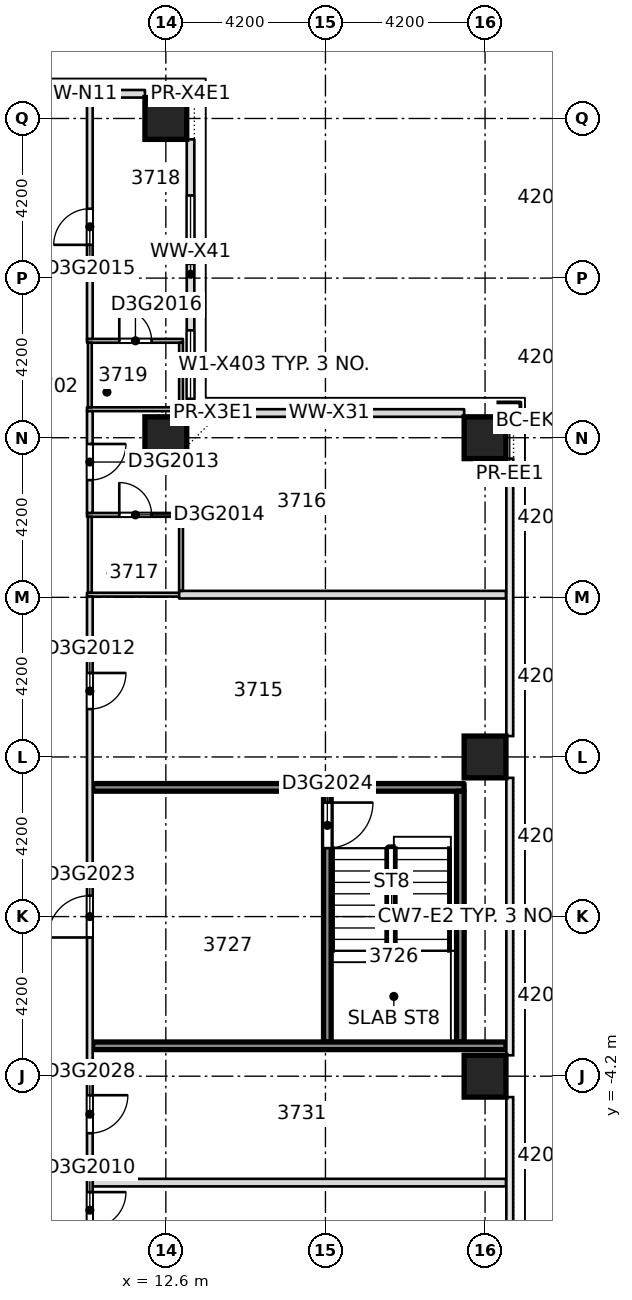
"""IFC4 building model, lengths in metres.
Left out: names, types, materials, properties, quantities, classifications, styles, units other than length and angle.
Written with IfcOpenShell. Run it as: python <this file> out.ifc"""

import sys

from ifc_helpers import new_model, si_unit, direction, frame, frame_2d, origin, origin_2d, place, context, subcontext, project, spatial, rectangle, extrude, element, fill, save


model = new_model("IFC4")
c1 = context("Model", 3, precision=1e-05, world=origin(), true_north=direction((0.0, 1.0)))
c2 = subcontext(c1, "Body", "Model", "MODEL_VIEW")
j1 = project(units=[si_unit("LENGTHUNIT", "METRE"), si_unit("PLANEANGLEUNIT", "RADIAN")], contexts=[c1])
p1 = place(None, origin())
s1 = spatial("IfcSite", under=j1, at=p1, CompositionType="ELEMENT")
p2 = place(p1, origin())
s2 = spatial("IfcBuilding", under=s1, at=p2, CompositionType="ELEMENT")
p3 = place(p2, frame((0.0, 0.0, 146.9)))
s3 = spatial("IfcBuildingStorey", under=s2, at=p3, CompositionType="ELEMENT", Elevation=146.9)
for number, where, z_axis, x_axis in (
    (1, (21.0, -4.2, -0.4), (0.0, 0.0, 1.0), (1.0, 0.0, 0.0)),
    (2, (21.0, 4.2, -0.4), (0.0, 0.0, 1.0), (1.0, 0.0, 0.0)),
    (3, (12.6, 12.6, -0.4), (0.0, 0.0, 1.0), (1.0, 0.0, 0.0)),
    (4, (21.0, 12.6, -0.4), (0.0, 0.0, 1.0), (1.0, 0.0, 0.0)),
    (5, (12.6, 21.0, -0.4), (0.0, 0.0, 1.0), (1.0, 0.0, 0.0)),
):
    element("IfcColumn", number, at=place(p3, frame(where, z_axis=z_axis, x_axis=x_axis)), inside=s3, PredefinedType="COLUMN", context=c2, shape_type="SweptSolid", body=[
        extrude(rectangle(XDim=1.1, YDim=1.1, at=origin_2d()), origin(), (0.0, 0.0, 1.0), 3.45),
    ])
p4 = place(p3, frame((10.675, -7.0, 0.0), z_axis=(0.0, 0.0, 1.0), x_axis=(1.0, 0.0, 0.0)))
e6 = element("IfcWall", 6, at=p4, inside=s3, PredefinedType="PARTITIONING", context=c2, shape_type="SweptSolid", body=[
    extrude(rectangle(XDim=10.875, YDim=0.2, at=frame_2d((5.438, 0.0))), origin(), (0.0, 0.0, 1.0), 3.05),
])
p5 = place(p3, frame((10.675, 3.4, 0.0), z_axis=(0.0, 0.0, 1.0), x_axis=(1.0, 0.0, 0.0)))
e7 = element("IfcWall", 7, at=p5, inside=s3, PredefinedType="SOLIDWALL", context=c2, shape_type="SweptSolid", body=[
    extrude(rectangle(XDim=9.773, YDim=0.2, at=frame_2d((4.886, 0.0))), origin(), (0.0, 0.0, 1.0), 3.05),
])
p6 = place(p3, frame((10.525, 8.47, 0.0), z_axis=(0.0, 0.0, 1.0), x_axis=(1.0, 0.0, 0.0)))
e8 = element("IfcWall", 8, at=p6, inside=s3, PredefinedType="PARTITIONING", context=c2, shape_type="SweptSolid", body=[
    extrude(rectangle(XDim=2.525, YDim=0.1, at=frame_2d((1.263, 0.0))), origin(), (0.0, 0.0, 1.0), 3.05),
])
p7 = place(p3, frame((12.95, 8.47, 0.0), z_axis=(0.0, 0.0, 1.0), x_axis=(1.0, 0.0, 0.0)))
e9 = element("IfcWall", 9, at=p7, inside=s3, PredefinedType="PARTITIONING", context=c2, shape_type="SweptSolid", body=[
    extrude(rectangle(XDim=8.6, YDim=0.2, at=frame_2d((4.3, 0.0))), origin(), (0.0, 0.0, 1.0), 3.05),
])
p8 = place(p3, frame((10.525, 10.57, 0.0), z_axis=(0.0, 0.0, 1.0), x_axis=(1.0, 0.0, 0.0)))
e10 = element("IfcWall", 10, at=p8, inside=s3, PredefinedType="PARTITIONING", context=c2, shape_type="SweptSolid", body=[
    extrude(rectangle(XDim=2.525, YDim=0.1, at=frame_2d((1.263, 0.0))), origin(), (0.0, 0.0, 1.0), 3.05),
])
p9 = place(p8, frame((0.85, 0.0, 0.0)))
e11 = element("IfcOpeningElement", 11, at=p9, cuts=e10, PredefinedType="OPENING", context=c2, shape_type="SweptSolid", body=[
    extrude(rectangle(XDim=0.85, YDim=2.1, at=frame_2d((0.425, 1.05))), frame((0.0, 0.06, 0.0), z_axis=(0.0, -1.0, 0.0), x_axis=(1.0, 0.0, 0.0)), (0.0, 0.0, 1.0), 0.12),
])
p10 = place(p3, frame((10.525, 13.35, 0.0), z_axis=(0.0, 0.0, 1.0), x_axis=(1.0, 0.0, 0.0)))
e12 = element("IfcWall", 12, at=p10, inside=s3, PredefinedType="PARTITIONING", context=c2, shape_type="SweptSolid", body=[
    extrude(rectangle(XDim=2.525, YDim=0.1, at=frame_2d((1.263, 0.0))), origin(), (0.0, 0.0, 1.0), 3.05),
])
p11 = place(p3, frame((12.95, 13.35, 0.0), z_axis=(0.0, 0.0, 1.0), x_axis=(1.0, 0.0, 0.0)))
e13 = element("IfcWall", 13, at=p11, inside=s3, PredefinedType="PARTITIONING", context=c2, shape_type="SweptSolid", body=[
    extrude(rectangle(XDim=0.2, YDim=0.2, at=frame_2d((0.1, 0.0))), origin(), (0.0, 0.0, 1.0), 3.05),
])
p12 = place(p3, frame((10.525, 15.15, 0.0), z_axis=(0.0, 0.0, 1.0), x_axis=(1.0, 0.0, 0.0)))
e14 = element("IfcWall", 14, at=p12, inside=s3, PredefinedType="PARTITIONING", context=c2, shape_type="SweptSolid", body=[
    extrude(rectangle(XDim=2.525, YDim=0.1, at=frame_2d((1.263, 0.0))), origin(), (0.0, 0.0, 1.0), 3.05),
])
p13 = place(p12, frame((0.85, 0.0, 0.0)))
e15 = element("IfcOpeningElement", 15, at=p13, cuts=e14, PredefinedType="OPENING", context=c2, shape_type="SweptSolid", body=[
    extrude(rectangle(XDim=0.85, YDim=2.1, at=frame_2d((0.425, 1.05))), frame((0.0, 0.06, 0.0), z_axis=(0.0, -1.0, 0.0), x_axis=(1.0, 0.0, 0.0)), (0.0, 0.0, 1.0), 0.12),
])
p14 = place(p3, frame((10.6, -10.33, 0.0), z_axis=(0.0, 0.0, 1.0), x_axis=(0.0, 1.0, 0.0)))
e16 = element("IfcWall", 16, at=p14, inside=s3, PredefinedType="PARTITIONING", context=c2, shape_type="SweptSolid", body=[
    extrude(rectangle(XDim=18.75, YDim=0.15, at=frame_2d((9.375, 0.0))), origin(), (0.0, 0.0, 1.0), 3.05),
])
p15 = place(p14, frame((2.13, 0.0, 0.0)))
e17 = element("IfcOpeningElement", 17, at=p15, cuts=e16, PredefinedType="OPENING", context=c2, shape_type="SweptSolid", body=[
    extrude(rectangle(XDim=0.95, YDim=2.1, at=frame_2d((0.475, 1.05))), frame((0.0, 0.085, 0.0), z_axis=(0.0, -1.0, 0.0), x_axis=(1.0, 0.0, 0.0)), (0.0, 0.0, 1.0), 0.17),
])
p16 = place(p14, frame((15.79, 0.0, 0.0)))
e18 = element("IfcOpeningElement", 18, at=p16, cuts=e16, PredefinedType="OPENING", context=c2, shape_type="SweptSolid", body=[
    extrude(rectangle(XDim=0.95, YDim=2.1, at=frame_2d((0.475, 1.05))), frame((0.0, 0.085, 0.0), z_axis=(0.0, -1.0, 0.0), x_axis=(1.0, 0.0, 0.0)), (0.0, 0.0, 1.0), 0.17),
])
p17 = place(p14, frame((9.78, 0.0, 0.0)))
e19 = element("IfcOpeningElement", 19, at=p17, cuts=e16, PredefinedType="OPENING", context=c2, shape_type="SweptSolid", body=[
    extrude(rectangle(XDim=1.1, YDim=2.1, at=frame_2d((0.55, 1.05))), frame((0.0, 0.085, 0.0), z_axis=(0.0, -1.0, 0.0), x_axis=(1.0, 0.0, 0.0)), (0.0, 0.0, 1.0), 0.17),
])
p18 = place(p14, frame((4.63, 0.0, 0.0)))
e20 = element("IfcOpeningElement", 20, at=p18, cuts=e16, PredefinedType="OPENING", context=c2, shape_type="SweptSolid", body=[
    extrude(rectangle(XDim=1.0, YDim=2.1, at=frame_2d((0.5, 1.05))), frame((0.0, 0.085, 0.0), z_axis=(0.0, -1.0, 0.0), x_axis=(1.0, 0.0, 0.0)), (0.0, 0.0, 1.0), 0.17),
])
p19 = place(p3, frame((10.6, 8.52, 0.0), z_axis=(0.0, 0.0, 1.0), x_axis=(0.0, 1.0, 0.0)))
e21 = element("IfcWall", 21, at=p19, inside=s3, PredefinedType="PARTITIONING", context=c2, shape_type="SweptSolid", body=[
    extrude(rectangle(XDim=2.0, YDim=0.1, at=frame_2d((1.0, 0.0))), origin(), (0.0, 0.0, 1.0), 3.05),
])
p20 = place(p3, frame((10.6, 10.62, 0.0), z_axis=(0.0, 0.0, 1.0), x_axis=(0.0, 1.0, 0.0)))
e22 = element("IfcWall", 22, at=p20, inside=s3, PredefinedType="PARTITIONING", context=c2, shape_type="SweptSolid", body=[
    extrude(rectangle(XDim=2.68, YDim=0.15, at=frame_2d((1.34, 0.0))), origin(), (0.0, 0.0, 1.0), 3.05),
])
p21 = place(p20, frame((0.865, 0.0, 0.0)))
e23 = element("IfcOpeningElement", 23, at=p21, cuts=e22, PredefinedType="OPENING", context=c2, shape_type="SweptSolid", body=[
    extrude(rectangle(XDim=0.95, YDim=2.1, at=frame_2d((0.475, 1.05))), frame((0.0, 0.085, 0.0), z_axis=(0.0, -1.0, 0.0), x_axis=(1.0, 0.0, 0.0)), (0.0, 0.0, 1.0), 0.17),
])
p22 = place(p3, frame((10.6, 13.4, 0.0), z_axis=(0.0, 0.0, 1.0), x_axis=(0.0, 1.0, 0.0)))
e24 = element("IfcWall", 24, at=p22, inside=s3, PredefinedType="PARTITIONING", context=c2, shape_type="SweptSolid", body=[
    extrude(rectangle(XDim=1.7, YDim=0.1, at=frame_2d((0.85, 0.0))), origin(), (0.0, 0.0, 1.0), 3.05),
])
p23 = place(p3, frame((10.6, 15.2, 0.0), z_axis=(0.0, 0.0, 1.0), x_axis=(0.0, 1.0, 0.0)))
e25 = element("IfcWall", 25, at=p23, inside=s3, PredefinedType="PARTITIONING", context=c2, shape_type="SweptSolid", body=[
    extrude(rectangle(XDim=6.35, YDim=0.15, at=frame_2d((3.175, 0.0))), origin(), (0.0, 0.0, 1.0), 3.05),
])
p24 = place(p23, frame((2.475, 0.0, 0.0)))
e26 = element("IfcOpeningElement", 26, at=p24, cuts=e25, PredefinedType="OPENING", context=c2, shape_type="SweptSolid", body=[
    extrude(rectangle(XDim=0.95, YDim=2.1, at=frame_2d((0.475, 1.05))), frame((0.0, 0.085, 0.0), z_axis=(0.0, -1.0, 0.0), x_axis=(1.0, 0.0, 0.0)), (0.0, 0.0, 1.0), 0.17),
])
p25 = place(p3, frame((13.0, 8.57, 0.0), z_axis=(0.0, 0.0, 1.0), x_axis=(0.0, 1.0, 0.0)))
e27 = element("IfcWall", 27, at=p25, inside=s3, PredefinedType="PARTITIONING", context=c2, shape_type="SweptSolid", body=[
    extrude(rectangle(XDim=1.95, YDim=0.1, at=frame_2d((0.975, 0.0))), origin(), (0.0, 0.0, 1.0), 3.05),
])
p26 = place(p3, frame((13.0, 13.45, 0.0), z_axis=(0.0, 0.0, 1.0), x_axis=(0.0, 1.0, 0.0)))
e28 = element("IfcWall", 28, at=p26, inside=s3, PredefinedType="PARTITIONING", context=c2, shape_type="SweptSolid", body=[
    extrude(rectangle(XDim=1.65, YDim=0.1, at=frame_2d((0.825, 0.0))), origin(), (0.0, 0.0, 1.0), 3.05),
])
p27 = place(p3, frame((16.85, -3.3, 0.0), z_axis=(0.0, 0.0, 1.0), x_axis=(0.0, 1.0, 0.0)))
e29 = element("IfcWall", 29, at=p27, inside=s3, PredefinedType="SOLIDWALL", context=c2, shape_type="SweptSolid", body=[
    extrude(rectangle(XDim=6.6, YDim=0.2, at=frame_2d((3.3, 0.0))), origin(), (0.0, 0.0, 1.0), 3.05),
])
p28 = place(p27, frame((5.1, 0.0, 0.0)))
e30 = element("IfcOpeningElement", 30, at=p28, cuts=e29, PredefinedType="OPENING", context=c2, shape_type="SweptSolid", body=[
    extrude(rectangle(XDim=1.2, YDim=2.1, at=frame_2d((0.6, 1.05))), frame((0.0, 0.11, 0.0), z_axis=(0.0, -1.0, 0.0), x_axis=(1.0, 0.0, 0.0)), (0.0, 0.0, 1.0), 0.22),
])
p29 = place(p3, frame((20.35, -3.298, 0.0), z_axis=(0.0, 0.0, 1.0), x_axis=(0.0, 1.0, 0.0)))
e31 = element("IfcWall", 31, at=p29, inside=s3, PredefinedType="SOLIDWALL", context=c2, shape_type="SweptSolid", body=[
    extrude(rectangle(XDim=6.596, YDim=0.2, at=frame_2d((3.298, 0.0))), origin(), (0.0, 0.0, 1.0), 3.05),
])
p30 = place(p3, frame((20.45, 13.25, 0.0), z_axis=(0.0, 0.0, 1.0), x_axis=(-1.0, 0.0, 0.0)))
e32 = element("IfcWall", 32, at=p30, inside=s3, PredefinedType="STANDARD", context=c2, shape_type="SweptSolid", body=[
    extrude(rectangle(XDim=7.1, YDim=0.2, at=frame_2d((3.55, 0.0))), origin(), (0.0, 0.0, 1.0), 3.05),
])
p31 = place(p3, frame((13.25, 13.35, 0.0), z_axis=(0.0, 0.0, 1.0), x_axis=(0.0, 1.0, 0.0)))
e33 = element("IfcWall", 33, at=p31, inside=s3, PredefinedType="STANDARD", context=c2, shape_type="SweptSolid", body=[
    extrude(rectangle(XDim=7.1, YDim=0.2, at=frame_2d((3.55, 0.0))), origin(), (0.0, 0.0, 1.0), 3.05),
])
p32 = place(p31, frame((0.275, 0.0, 0.2)))
e34 = element("IfcOpeningElement", 34, at=p32, cuts=e33, PredefinedType="OPENING", context=c2, shape_type="SweptSolid", body=[
    extrude(rectangle(XDim=1.8, YDim=2.65, at=frame_2d((0.9, 1.325))), frame((0.0, 0.11, 0.0), z_axis=(0.0, -1.0, 0.0), x_axis=(1.0, 0.0, 0.0)), (0.0, 0.0, 1.0), 0.22),
])
p33 = place(p31, frame((3.825, 0.0, 0.2)))
e35 = element("IfcOpeningElement", 35, at=p33, cuts=e33, PredefinedType="OPENING", context=c2, shape_type="SweptSolid", body=[
    extrude(rectangle(XDim=1.8, YDim=2.65, at=frame_2d((0.9, 1.325))), frame((0.0, 0.11, 0.0), z_axis=(0.0, -1.0, 0.0), x_axis=(1.0, 0.0, 0.0)), (0.0, 0.0, 1.0), 0.22),
])
p34 = place(p3, frame((12.05, 21.65, 0.0), z_axis=(0.0, 0.0, 1.0), x_axis=(-1.0, 0.0, 0.0)))
e36 = element("IfcWall", 36, at=p34, inside=s3, PredefinedType="STANDARD", context=c2, shape_type="SweptSolid", body=[
    extrude(rectangle(XDim=3.65, YDim=0.2, at=frame_2d((1.825, 0.0))), origin(), (0.0, 0.0, 1.0), 3.05),
])
p35 = place(p34, frame((1.67, 0.0, 0.2)))
e37 = element("IfcOpeningElement", 37, at=p35, cuts=e36, PredefinedType="OPENING", context=c2, shape_type="SweptSolid", body=[
    extrude(rectangle(XDim=1.8, YDim=2.65, at=frame_2d((0.9, 1.325))), frame((0.0, 0.11, 0.0), z_axis=(0.0, -1.0, 0.0), x_axis=(1.0, 0.0, 0.0)), (0.0, 0.0, 1.0), 0.22),
])
p36 = place(p3, frame((10.675, -3.4, 0.0), z_axis=(0.0, 0.0, 1.0), x_axis=(1.0, 0.0, 0.0)))
e38 = element("IfcWall", 38, at=p36, inside=s3, PredefinedType="SOLIDWALL", context=c2, shape_type="SweptSolid", body=[
    extrude(rectangle(XDim=10.875, YDim=0.2, at=frame_2d((5.438, 0.0))), origin(), (0.0, 0.0, 1.0), 3.05),
])
p37 = place(p15, origin())
e39 = element("IfcDoor", 39, at=p37, inside=s3, OperationType="SINGLE_SWING_LEFT", PredefinedType="DOOR", context=c2, shape_type="SweptSolid", body=[
    extrude(rectangle(XDim=0.95, YDim=2.1, at=frame_2d((0.475, 1.05))), frame((0.0, 0.025, 0.0), z_axis=(0.0, -1.0, 0.0), x_axis=(1.0, 0.0, 0.0)), (0.0, 0.0, 1.0), 0.05),
])
fill(e17, e39)
p38 = place(p16, origin())
e40 = element("IfcDoor", 40, at=p38, inside=s3, OperationType="SINGLE_SWING_RIGHT", PredefinedType="DOOR", context=c2, shape_type="SweptSolid", body=[
    extrude(rectangle(XDim=0.95, YDim=2.1, at=frame_2d((0.475, 1.05))), frame((0.0, 0.025, 0.0), z_axis=(0.0, -1.0, 0.0), x_axis=(1.0, 0.0, 0.0)), (0.0, 0.0, 1.0), 0.05),
])
fill(e18, e40)
p39 = place(p21, origin())
e41 = element("IfcDoor", 41, at=p39, inside=s3, OperationType="SINGLE_SWING_RIGHT", PredefinedType="DOOR", context=c2, shape_type="SweptSolid", body=[
    extrude(rectangle(XDim=0.95, YDim=2.1, at=frame_2d((0.475, 1.05))), frame((0.0, 0.025, 0.0), z_axis=(0.0, -1.0, 0.0), x_axis=(1.0, 0.0, 0.0)), (0.0, 0.0, 1.0), 0.05),
])
fill(e23, e41)
p40 = place(p9, origin())
e42 = element("IfcDoor", 42, at=p40, inside=s3, OperationType="SINGLE_SWING_RIGHT", PredefinedType="DOOR", context=c2, shape_type="SweptSolid", body=[
    extrude(rectangle(XDim=0.85, YDim=2.1, at=frame_2d((0.425, 1.05))), frame((0.0, 0.025, 0.0), z_axis=(0.0, -1.0, 0.0), x_axis=(1.0, 0.0, 0.0)), (0.0, 0.0, 1.0), 0.05),
])
fill(e11, e42)
p41 = place(p24, origin())
e43 = element("IfcDoor", 43, at=p41, inside=s3, OperationType="SINGLE_SWING_LEFT", PredefinedType="DOOR", context=c2, shape_type="SweptSolid", body=[
    extrude(rectangle(XDim=0.95, YDim=2.1, at=frame_2d((0.475, 1.05))), frame((0.0, 0.025, 0.0), z_axis=(0.0, -1.0, 0.0), x_axis=(1.0, 0.0, 0.0)), (0.0, 0.0, 1.0), 0.05),
])
fill(e26, e43)
p42 = place(p13, origin())
e44 = element("IfcDoor", 44, at=p42, inside=s3, OperationType="SINGLE_SWING_RIGHT", PredefinedType="DOOR", context=c2, shape_type="SweptSolid", body=[
    extrude(rectangle(XDim=0.85, YDim=2.1, at=frame_2d((0.425, 1.05))), frame((0.0, 0.025, 0.0), z_axis=(0.0, -1.0, 0.0), x_axis=(1.0, 0.0, 0.0)), (0.0, 0.0, 1.0), 0.05),
])
fill(e15, e44)
p43 = place(p17, origin())
e45 = element("IfcDoor", 45, at=p43, inside=s3, OperationType="SINGLE_SWING_LEFT", PredefinedType="DOOR", context=c2, shape_type="SweptSolid", body=[
    extrude(rectangle(XDim=1.1, YDim=2.1, at=frame_2d((0.55, 1.05))), frame((0.0, 0.025, 0.0), z_axis=(0.0, -1.0, 0.0), x_axis=(1.0, 0.0, 0.0)), (0.0, 0.0, 1.0), 0.05),
])
fill(e19, e45)
p44 = place(p28, origin())
e46 = element("IfcDoor", 46, at=p44, inside=s3, OperationType="SINGLE_SWING_LEFT", PredefinedType="DOOR", context=c2, shape_type="SweptSolid", body=[
    extrude(rectangle(XDim=1.2, YDim=2.1, at=frame_2d((0.6, 1.05))), frame((0.0, 0.025, 0.0), z_axis=(0.0, -1.0, 0.0), x_axis=(1.0, 0.0, 0.0)), (0.0, 0.0, 1.0), 0.05),
])
fill(e30, e46)
p45 = place(p18, origin())
e47 = element("IfcDoor", 47, at=p45, inside=s3, OperationType="SINGLE_SWING_RIGHT", PredefinedType="DOOR", context=c2, shape_type="SweptSolid", body=[
    extrude(rectangle(XDim=1.0, YDim=2.1, at=frame_2d((0.5, 1.05))), frame((0.0, 0.025, 0.0), z_axis=(0.0, -1.0, 0.0), x_axis=(1.0, 0.0, 0.0)), (0.0, 0.0, 1.0), 0.05),
])
fill(e20, e47)
p46 = place(p32, origin())
e48 = element("IfcWindow", 48, at=p46, inside=s3, PartitioningType="SINGLE_PANEL", PredefinedType="WINDOW", context=c2, shape_type="SweptSolid", body=[
    extrude(rectangle(XDim=1.8, YDim=2.65, at=frame_2d((0.9, 1.325))), frame((0.0, 0.03, 0.0), z_axis=(0.0, -1.0, 0.0), x_axis=(1.0, 0.0, 0.0)), (0.0, 0.0, 1.0), 0.06),
])
fill(e34, e48)
p47 = place(p33, origin())
e49 = element("IfcWindow", 49, at=p47, inside=s3, PartitioningType="SINGLE_PANEL", PredefinedType="WINDOW", context=c2, shape_type="SweptSolid", body=[
    extrude(rectangle(XDim=1.8, YDim=2.65, at=frame_2d((0.9, 1.325))), frame((0.0, 0.03, 0.0), z_axis=(0.0, -1.0, 0.0), x_axis=(1.0, 0.0, 0.0)), (0.0, 0.0, 1.0), 0.06),
])
fill(e35, e49)
p48 = place(p35, origin())
e50 = element("IfcWindow", 50, at=p48, inside=s3, PartitioningType="SINGLE_PANEL", PredefinedType="WINDOW", context=c2, shape_type="SweptSolid", body=[
    extrude(rectangle(XDim=1.8, YDim=2.65, at=frame_2d((0.9, 1.325))), frame((0.0, 0.03, 0.0), z_axis=(0.0, -1.0, 0.0), x_axis=(1.0, 0.0, 0.0)), (0.0, 0.0, 1.0), 0.06),
])
fill(e37, e50)
save(model, sys.argv[1])
